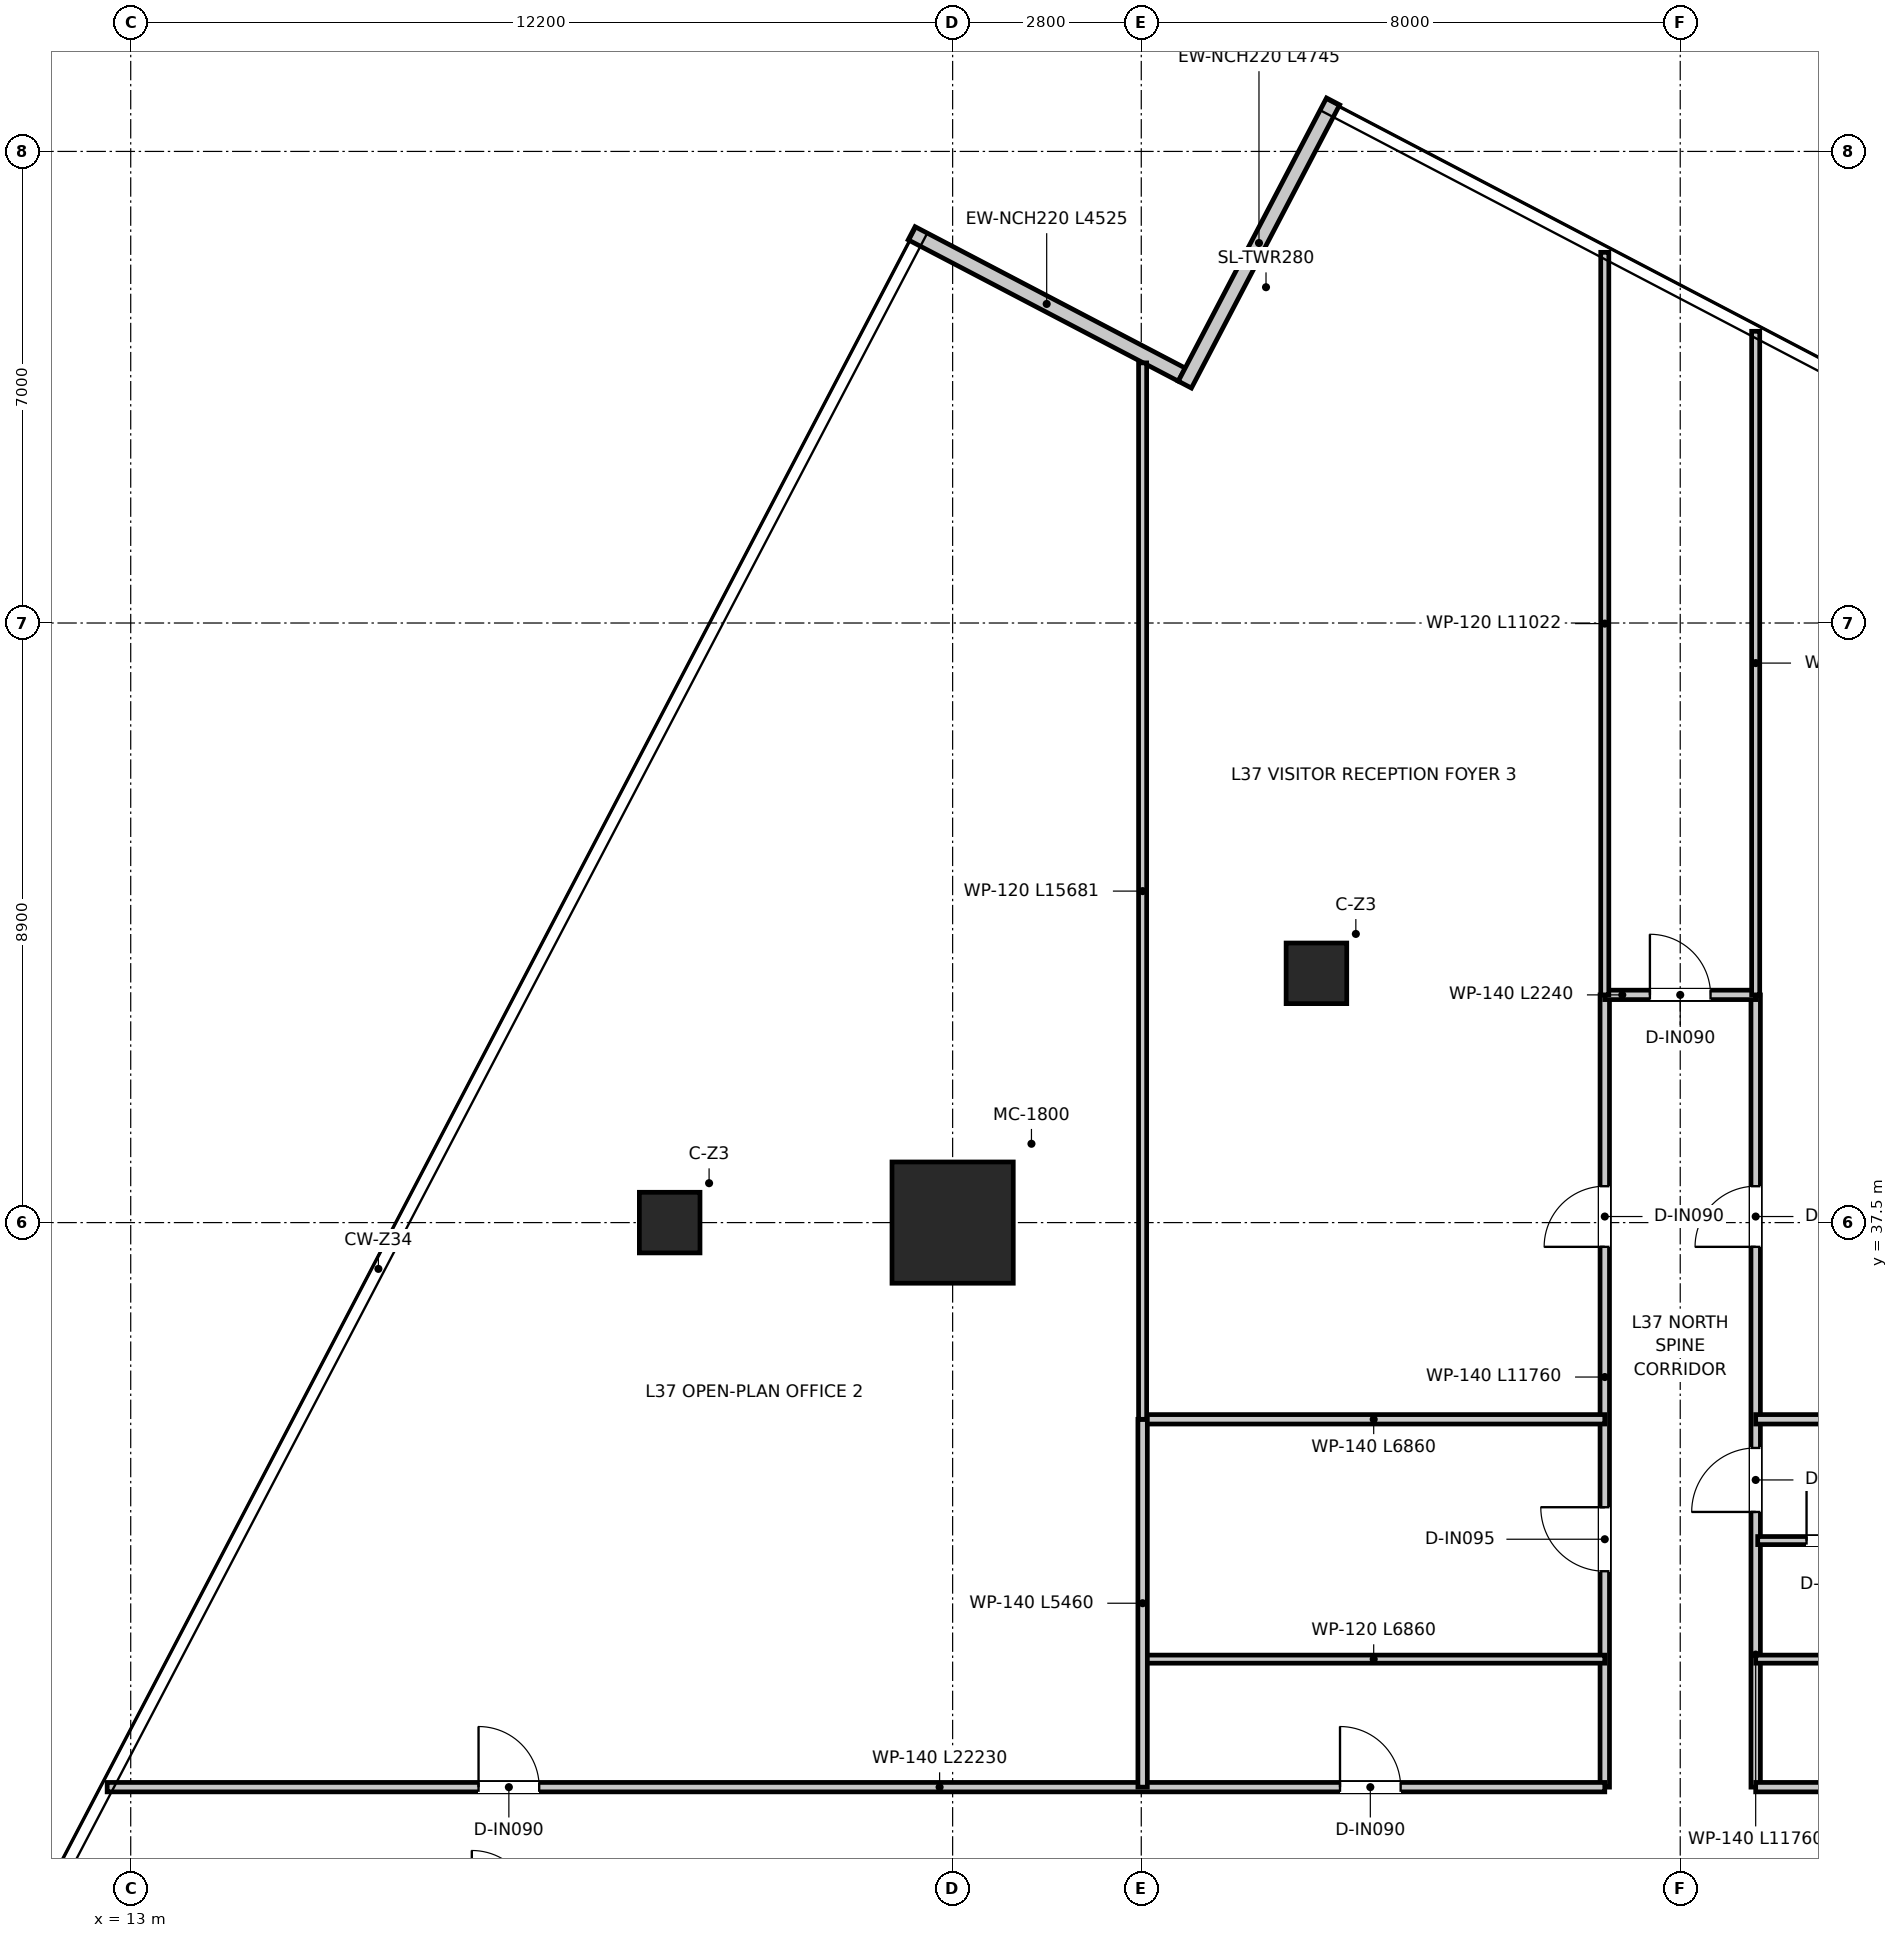
"""IFC4 building model, lengths in metres.
Left out: names, types, materials, properties, quantities, classifications, styles, units other than length and angle.
Written with IfcOpenShell. Run it as: python <this file> out.ifc"""

import sys

from ifc_helpers import new_model, si_unit, direction, frame, frame_2d, origin, origin_2d, place, context, subcontext, project, spatial, rectangle, extrude, source, transform, mapped, element, fill, save


model = new_model("IFC4")
c1 = context("Model", 3, precision=1e-05, world=origin(), true_north=direction((0.0, 1.0)))
c2 = subcontext(c1, "Body", "Model", "MODEL_VIEW")
j1 = project(units=[si_unit("LENGTHUNIT", "METRE"), si_unit("PLANEANGLEUNIT", "RADIAN")], contexts=[c1])
p1 = place(None, origin())
s1 = spatial("IfcSite", under=j1, at=p1, CompositionType="ELEMENT")
p2 = place(p1, origin())
s2 = spatial("IfcBuilding", under=s1, at=p2, CompositionType="ELEMENT")
p3 = place(p2, frame((0.0, 0.0, 154.1)))
s3 = spatial("IfcBuildingStorey", under=s2, at=p3, CompositionType="ELEMENT", Elevation=154.1)
m1 = source(origin(), c2, "Body", "SweptSolid", [
    extrude(rectangle(XDim=1.8, YDim=1.8, at=origin_2d()), origin(), (0.0, 0.0, 1.0), 3.95),
])
p4 = place(p3, frame((25.2, 37.5, 0.0), z_axis=(0.0, 0.0, 1.0), x_axis=(1.0, 0.0, 0.0)))
e1 = element("IfcColumn", 1, at=p4, inside=s3, PredefinedType="USERDEFINED", context=c2, shape_type="MappedRepresentation", body=[
    mapped(m1, transform((0.0, 0.0, 0.0), x_axis=(1.0, 0.0, 0.0), y_axis=(0.0, 1.0, 0.0), z_axis=(0.0, 0.0, 1.0), scale=1.0)),
])
m2 = source(origin(), c2, "Body", "SweptSolid", [
    extrude(rectangle(XDim=0.9, YDim=0.9, at=origin_2d()), origin(), (0.0, 0.0, 1.0), 3.95),
])
for number, where, z_axis, x_axis in (
    (2, (21.0, 37.5, 0.0), (0.0, 0.0, 1.0), (1.0, 0.0, 0.0)),
    (3, (30.6, 41.2, 0.0), (0.0, 0.0, 1.0), (1.0, 0.0, 0.0)),
):
    element("IfcColumn", number, at=place(p3, frame(where, z_axis=z_axis, x_axis=x_axis)), inside=s3, PredefinedType="COLUMN", context=c2, shape_type="MappedRepresentation", body=[
        mapped(m2, transform((0.0, 0.0, 0.0), x_axis=(1.0, 0.0, 0.0), y_axis=(0.0, 1.0, 0.0), z_axis=(0.0, 0.0, 1.0), scale=1.0)),
    ])
p5 = place(p3, frame((28.601, 50.087, 0.0), z_axis=(0.0, 0.0, 1.0), x_axis=(-0.885997280363, 0.463690434653, 0.0)))
e4 = element("IfcWall", 4, at=p5, inside=s3, PredefinedType="ELEMENTEDWALL", context=c2, shape_type="SweptSolid", body=[
    extrude(rectangle(XDim=4.525, YDim=0.22, at=frame_2d((2.262, 0.0))), origin(), (0.0, 0.0, 1.0), 3.67),
])
p6 = place(p3, frame((30.847, 54.143, 0.0), z_axis=(0.0, 0.0, 1.0), x_axis=(-0.463643579795, -0.886021800474, 0.0)))
e5 = element("IfcWall", 5, at=p6, inside=s3, PredefinedType="ELEMENTEDWALL", context=c2, shape_type="SweptSolid", body=[
    extrude(rectangle(XDim=4.745, YDim=0.22, at=frame_2d((2.373, 0.0))), origin(), (0.0, 0.0, 1.0), 3.67),
])
p7 = place(p3, frame((34.88, 29.12, 0.0), z_axis=(0.0, 0.0, 1.0), x_axis=(0.0, 1.0, 0.0)))
e6 = element("IfcWall", 6, at=p7, inside=s3, PredefinedType="PARTITIONING", context=c2, shape_type="SweptSolid", body=[
    extrude(rectangle(XDim=11.76, YDim=0.14, at=frame_2d((5.88, 0.0))), origin(), (0.0, 0.0, 1.0), 3.03),
])
p8 = place(p7, frame((3.205, 0.0, 0.0)))
e7 = element("IfcOpeningElement", 7, at=p8, cuts=e6, PredefinedType="OPENING", context=c2, shape_type="SweptSolid", body=[
    extrude(rectangle(XDim=0.95, YDim=2.1, at=frame_2d((0.475, 1.05))), frame((0.0, 0.08, 0.0), z_axis=(0.0, -1.0, 0.0), x_axis=(1.0, 0.0, 0.0)), (0.0, 0.0, 1.0), 0.16),
])
p9 = place(p7, frame((8.02, 0.0, 0.0)))
e8 = element("IfcOpeningElement", 8, at=p9, cuts=e6, PredefinedType="OPENING", context=c2, shape_type="SweptSolid", body=[
    extrude(rectangle(XDim=0.9, YDim=2.1, at=frame_2d((0.45, 1.05))), frame((0.0, 0.08, 0.0), z_axis=(0.0, -1.0, 0.0), x_axis=(1.0, 0.0, 0.0)), (0.0, 0.0, 1.0), 0.16),
])
p10 = place(p3, frame((37.12, 29.12, 0.0), z_axis=(0.0, 0.0, 1.0), x_axis=(0.0, 1.0, 0.0)))
e9 = element("IfcWall", 9, at=p10, inside=s3, PredefinedType="PARTITIONING", context=c2, shape_type="SweptSolid", body=[
    extrude(rectangle(XDim=11.76, YDim=0.14, at=frame_2d((5.88, 0.0))), origin(), (0.0, 0.0, 1.0), 3.03),
])
p11 = place(p10, frame((4.085, 0.0, 0.0)))
e10 = element("IfcOpeningElement", 10, at=p11, cuts=e9, PredefinedType="OPENING", context=c2, shape_type="SweptSolid", body=[
    extrude(rectangle(XDim=0.95, YDim=2.1, at=frame_2d((0.475, 1.05))), frame((0.0, 0.08, 0.0), z_axis=(0.0, -1.0, 0.0), x_axis=(1.0, 0.0, 0.0)), (0.0, 0.0, 1.0), 0.16),
])
p12 = place(p10, frame((8.02, 0.0, 0.0)))
e11 = element("IfcOpeningElement", 11, at=p12, cuts=e9, PredefinedType="OPENING", context=c2, shape_type="SweptSolid", body=[
    extrude(rectangle(XDim=0.9, YDim=2.1, at=frame_2d((0.45, 1.05))), frame((0.0, 0.08, 0.0), z_axis=(0.0, -1.0, 0.0), x_axis=(1.0, 0.0, 0.0)), (0.0, 0.0, 1.0), 0.16),
])
p13 = place(p3, frame((34.88, 40.88, 0.0), z_axis=(0.0, 0.0, 1.0), x_axis=(1.0, 0.0, 0.0)))
e12 = element("IfcWall", 12, at=p13, inside=s3, PredefinedType="PARTITIONING", context=c2, shape_type="SweptSolid", body=[
    extrude(rectangle(XDim=2.24, YDim=0.14, at=frame_2d((1.12, 0.0))), origin(), (0.0, 0.0, 1.0), 3.67),
])
p14 = place(p13, frame((0.67, 0.0, 0.0)))
e13 = element("IfcOpeningElement", 13, at=p14, cuts=e12, PredefinedType="OPENING", context=c2, shape_type="SweptSolid", body=[
    extrude(rectangle(XDim=0.9, YDim=2.1, at=frame_2d((0.45, 1.05))), frame((0.0, 0.08, 0.0), z_axis=(0.0, -1.0, 0.0), x_axis=(1.0, 0.0, 0.0)), (0.0, 0.0, 1.0), 0.16),
])
p15 = place(p3, frame((12.65, 29.12, 0.0), z_axis=(0.0, 0.0, 1.0), x_axis=(1.0, 0.0, 0.0)))
e14 = element("IfcWall", 14, at=p15, inside=s3, PredefinedType="PARTITIONING", context=c2, shape_type="SweptSolid", body=[
    extrude(rectangle(XDim=22.229, YDim=0.14, at=frame_2d((11.115, 0.0))), origin(), (0.0, 0.0, 1.0), 3.03),
])
p16 = place(p15, frame((18.3, 0.0, 0.0)))
e15 = element("IfcOpeningElement", 15, at=p16, cuts=e14, PredefinedType="OPENING", context=c2, shape_type="SweptSolid", body=[
    extrude(rectangle(XDim=0.9, YDim=2.1, at=frame_2d((0.45, 1.05))), frame((0.0, 0.08, 0.0), z_axis=(0.0, -1.0, 0.0), x_axis=(1.0, 0.0, 0.0)), (0.0, 0.0, 1.0), 0.16),
])
p17 = place(p15, frame((5.513, 0.0, 0.0)))
e16 = element("IfcOpeningElement", 16, at=p17, cuts=e14, PredefinedType="OPENING", context=c2, shape_type="SweptSolid", body=[
    extrude(rectangle(XDim=0.9, YDim=2.1, at=frame_2d((0.45, 1.05))), frame((0.0, 0.08, 0.0), z_axis=(0.0, -1.0, 0.0), x_axis=(1.0, 0.0, 0.0)), (0.0, 0.0, 1.0), 0.16),
])
p18 = place(p3, frame((37.12, 29.12, 0.0), z_axis=(0.0, 0.0, 1.0), x_axis=(1.0, 0.0, 0.0)))
e17 = element("IfcWall", 17, at=p18, inside=s3, PredefinedType="PARTITIONING", context=c2, shape_type="SweptSolid", body=[
    extrude(rectangle(XDim=24.763, YDim=0.14, at=frame_2d((12.381, 0.0))), origin(), (0.0, 0.0, 1.0), 3.03),
])
p19 = place(p18, frame((3.03, 0.0, 0.0)))
e18 = element("IfcOpeningElement", 18, at=p19, cuts=e17, PredefinedType="OPENING", context=c2, shape_type="SweptSolid", body=[
    extrude(rectangle(XDim=0.9, YDim=2.1, at=frame_2d((0.45, 1.05))), frame((0.0, 0.08, 0.0), z_axis=(0.0, -1.0, 0.0), x_axis=(1.0, 0.0, 0.0)), (0.0, 0.0, 1.0), 0.16),
])
p20 = place(p18, frame((8.52, 0.0, 0.0)))
e19 = element("IfcOpeningElement", 19, at=p20, cuts=e17, PredefinedType="OPENING", context=c2, shape_type="SweptSolid", body=[
    extrude(rectangle(XDim=0.9, YDim=2.1, at=frame_2d((0.45, 1.05))), frame((0.0, 0.08, 0.0), z_axis=(0.0, -1.0, 0.0), x_axis=(1.0, 0.0, 0.0)), (0.0, 0.0, 1.0), 0.16),
])
p21 = place(p18, frame((12.13, 0.0, 0.0)))
e20 = element("IfcOpeningElement", 20, at=p21, cuts=e17, PredefinedType="OPENING", context=c2, shape_type="SweptSolid", body=[
    extrude(rectangle(XDim=0.9, YDim=2.1, at=frame_2d((0.45, 1.05))), frame((0.0, 0.08, 0.0), z_axis=(0.0, -1.0, 0.0), x_axis=(1.0, 0.0, 0.0)), (0.0, 0.0, 1.0), 0.16),
])
p22 = place(p18, frame((19.217, 0.0, 0.0)))
e21 = element("IfcOpeningElement", 21, at=p22, cuts=e17, PredefinedType="OPENING", context=c2, shape_type="SweptSolid", body=[
    extrude(rectangle(XDim=0.9, YDim=2.1, at=frame_2d((0.45, 1.05))), frame((0.0, 0.08, 0.0), z_axis=(0.0, -1.0, 0.0), x_axis=(1.0, 0.0, 0.0)), (0.0, 0.0, 1.0), 0.16),
])
for number, where, z_axis, x_axis in (
    (22, (28.02, 31.02, 0.0), (0.0, 0.0, 1.0), (1.0, 0.0, 0.0)),
    (23, (37.12, 31.02, 0.0), (0.0, 0.0, 1.0), (1.0, 0.0, 0.0)),
):
    element("IfcWall", number, at=place(p3, frame(where, z_axis=z_axis, x_axis=x_axis)), inside=s3, PredefinedType="PARTITIONING", context=c2, shape_type="SweptSolid", body=[
        extrude(rectangle(XDim=6.86, YDim=0.12, at=frame_2d((3.43, 0.0))), origin(), (0.0, 0.0, 1.0), 3.08),
    ])
for number, where, z_axis, x_axis in (
    (24, (28.02, 34.58, 0.0), (0.0, 0.0, 1.0), (1.0, 0.0, 0.0)),
    (25, (37.12, 34.58, 0.0), (0.0, 0.0, 1.0), (1.0, 0.0, 0.0)),
):
    element("IfcWall", number, at=place(p3, frame(where, z_axis=z_axis, x_axis=x_axis)), inside=s3, PredefinedType="PARTITIONING", context=c2, shape_type="SweptSolid", body=[
        extrude(rectangle(XDim=6.86, YDim=0.14, at=frame_2d((3.43, 0.0))), origin(), (0.0, 0.0, 1.0), 3.08),
    ])
p23 = place(p3, frame((28.02, 29.12, 0.0), z_axis=(0.0, 0.0, 1.0), x_axis=(0.0, 1.0, 0.0)))
e26 = element("IfcWall", 26, at=p23, inside=s3, PredefinedType="PARTITIONING", context=c2, shape_type="SweptSolid", body=[
    extrude(rectangle(XDim=5.46, YDim=0.14, at=frame_2d((2.73, 0.0))), origin(), (0.0, 0.0, 1.0), 3.31),
])
p24 = place(p3, frame((37.15, 32.78, 0.0), z_axis=(0.0, 0.0, 1.0), x_axis=(1.0, 0.0, 0.0)))
e27 = element("IfcWall", 27, at=p24, inside=s3, PredefinedType="PARTITIONING", context=c2, shape_type="SweptSolid", body=[
    extrude(rectangle(XDim=6.8, YDim=0.12, at=frame_2d((3.4, 0.0))), origin(), (0.0, 0.0, 1.0), 3.08),
])
p25 = place(p24, frame((0.725, 0.0, 0.0)))
e28 = element("IfcOpeningElement", 28, at=p25, cuts=e27, PredefinedType="OPENING", context=c2, shape_type="SweptSolid", body=[
    extrude(rectangle(XDim=0.85, YDim=2.1, at=frame_2d((0.425, 1.05))), frame((0.0, 0.07, 0.0), z_axis=(0.0, -1.0, 0.0), x_axis=(1.0, 0.0, 0.0)), (0.0, 0.0, 1.0), 0.14),
])
p26 = place(p24, frame((3.065, 0.0, 0.0)))
e29 = element("IfcOpeningElement", 29, at=p26, cuts=e27, PredefinedType="OPENING", context=c2, shape_type="SweptSolid", body=[
    extrude(rectangle(XDim=0.85, YDim=2.1, at=frame_2d((0.425, 1.05))), frame((0.0, 0.07, 0.0), z_axis=(0.0, -1.0, 0.0), x_axis=(1.0, 0.0, 0.0)), (0.0, 0.0, 1.0), 0.14),
])
p27 = place(p24, frame((5.25, 0.0, 0.0)))
e30 = element("IfcOpeningElement", 30, at=p27, cuts=e27, PredefinedType="OPENING", context=c2, shape_type="SweptSolid", body=[
    extrude(rectangle(XDim=0.9, YDim=2.1, at=frame_2d((0.45, 1.05))), frame((0.0, 0.07, 0.0), z_axis=(0.0, -1.0, 0.0), x_axis=(1.0, 0.0, 0.0)), (0.0, 0.0, 1.0), 0.14),
])
p28 = place(p3, frame((34.88, 40.88, 0.0), z_axis=(0.0, 0.0, 1.0), x_axis=(0.0, 1.0, 0.0)))
e31 = element("IfcWall", 31, at=p28, inside=s3, PredefinedType="PARTITIONING", context=c2, shape_type="SweptSolid", body=[
    extrude(rectangle(XDim=11.022, YDim=0.12, at=frame_2d((5.511, 0.0))), origin(), (0.0, 0.0, 1.0), 3.28),
])
p29 = place(p3, frame((37.12, 40.88, 0.0), z_axis=(0.0, 0.0, 1.0), x_axis=(0.0, 1.0, 0.0)))
e32 = element("IfcWall", 32, at=p29, inside=s3, PredefinedType="PARTITIONING", context=c2, shape_type="SweptSolid", body=[
    extrude(rectangle(XDim=9.85, YDim=0.12, at=frame_2d((4.925, 0.0))), origin(), (0.0, 0.0, 1.0), 3.28),
])
p30 = place(p3, frame((28.02, 34.58, 0.0), z_axis=(0.0, 0.0, 1.0), x_axis=(0.0, 1.0, 0.0)))
e33 = element("IfcWall", 33, at=p30, inside=s3, PredefinedType="PARTITIONING", context=c2, shape_type="SweptSolid", body=[
    extrude(rectangle(XDim=15.681, YDim=0.12, at=frame_2d((7.841, 0.0))), origin(), (0.0, 0.0, 1.0), 3.03),
])
p31 = place(p16, origin())
e34 = element("IfcDoor", 34, at=p31, inside=s3, OperationType="SINGLE_SWING_LEFT", PredefinedType="DOOR", context=c2, shape_type="SweptSolid", body=[
    extrude(rectangle(XDim=0.9, YDim=2.1, at=frame_2d((0.45, 1.05))), frame((0.0, 0.025, 0.0), z_axis=(0.0, -1.0, 0.0), x_axis=(1.0, 0.0, 0.0)), (0.0, 0.0, 1.0), 0.05),
])
fill(e15, e34)
p32 = place(p11, origin())
e35 = element("IfcDoor", 35, at=p32, inside=s3, OperationType="SINGLE_SWING_LEFT", PredefinedType="DOOR", context=c2, shape_type="SweptSolid", body=[
    extrude(rectangle(XDim=0.95, YDim=2.1, at=frame_2d((0.475, 1.05))), frame((0.0, 0.025, 0.0), z_axis=(0.0, -1.0, 0.0), x_axis=(1.0, 0.0, 0.0)), (0.0, 0.0, 1.0), 0.05),
])
fill(e10, e35)
p33 = place(p8, origin())
e36 = element("IfcDoor", 36, at=p33, inside=s3, OperationType="SINGLE_SWING_RIGHT", PredefinedType="DOOR", context=c2, shape_type="SweptSolid", body=[
    extrude(rectangle(XDim=0.95, YDim=2.1, at=frame_2d((0.475, 1.05))), frame((0.0, 0.025, 0.0), z_axis=(0.0, -1.0, 0.0), x_axis=(1.0, 0.0, 0.0)), (0.0, 0.0, 1.0), 0.05),
])
fill(e7, e36)
p34 = place(p25, origin())
e37 = element("IfcDoor", 37, at=p34, inside=s3, OperationType="SINGLE_SWING_LEFT", PredefinedType="DOOR", context=c2, shape_type="SweptSolid", body=[
    extrude(rectangle(XDim=0.85, YDim=2.1, at=frame_2d((0.425, 1.05))), frame((0.0, 0.025, 0.0), z_axis=(0.0, -1.0, 0.0), x_axis=(1.0, 0.0, 0.0)), (0.0, 0.0, 1.0), 0.05),
])
fill(e28, e37)
p35 = place(p14, origin())
e38 = element("IfcDoor", 38, at=p35, inside=s3, OperationType="SINGLE_SWING_LEFT", PredefinedType="DOOR", context=c2, shape_type="SweptSolid", body=[
    extrude(rectangle(XDim=0.9, YDim=2.1, at=frame_2d((0.45, 1.05))), frame((0.0, 0.025, 0.0), z_axis=(0.0, -1.0, 0.0), x_axis=(1.0, 0.0, 0.0)), (0.0, 0.0, 1.0), 0.05),
])
fill(e13, e38)
p36 = place(p17, origin())
e39 = element("IfcDoor", 39, at=p36, inside=s3, OperationType="SINGLE_SWING_LEFT", PredefinedType="DOOR", context=c2, shape_type="SweptSolid", body=[
    extrude(rectangle(XDim=0.9, YDim=2.1, at=frame_2d((0.45, 1.05))), frame((0.0, 0.025, 0.0), z_axis=(0.0, -1.0, 0.0), x_axis=(1.0, 0.0, 0.0)), (0.0, 0.0, 1.0), 0.05),
])
fill(e16, e39)
p37 = place(p9, origin())
e40 = element("IfcDoor", 40, at=p37, inside=s3, OperationType="SINGLE_SWING_LEFT", PredefinedType="DOOR", context=c2, shape_type="SweptSolid", body=[
    extrude(rectangle(XDim=0.9, YDim=2.1, at=frame_2d((0.45, 1.05))), frame((0.0, 0.025, 0.0), z_axis=(0.0, -1.0, 0.0), x_axis=(1.0, 0.0, 0.0)), (0.0, 0.0, 1.0), 0.05),
])
fill(e8, e40)
p38 = place(p12, origin())
e41 = element("IfcDoor", 41, at=p38, inside=s3, OperationType="SINGLE_SWING_LEFT", PredefinedType="DOOR", context=c2, shape_type="SweptSolid", body=[
    extrude(rectangle(XDim=0.9, YDim=2.1, at=frame_2d((0.45, 1.05))), frame((0.0, 0.025, 0.0), z_axis=(0.0, -1.0, 0.0), x_axis=(1.0, 0.0, 0.0)), (0.0, 0.0, 1.0), 0.05),
])
fill(e11, e41)
save(model, sys.argv[1])
